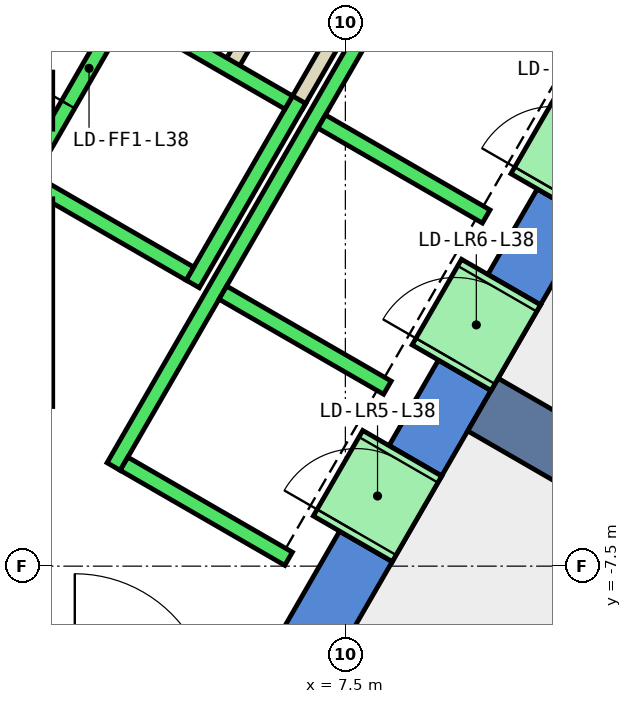
"""IFC4 building model, lengths in metres.
Left out: names, types, materials, properties, quantities, classifications, styles, units other than length and angle.
Written with IfcOpenShell. Run it as: python <this file> out.ifc"""

import sys

from ifc_helpers import new_model, si_unit, direction, frame, frame_2d, origin, place, context, subcontext, project, spatial, polyline, rectangle, outline, extrude, element, fill, save


model = new_model("IFC4")
c1 = context("Model", 3, precision=1e-05, world=origin(), true_north=direction((0.0, 1.0)))
c2 = subcontext(c1, "Body", "Model", "MODEL_VIEW")
j1 = project(units=[si_unit("LENGTHUNIT", "METRE"), si_unit("PLANEANGLEUNIT", "RADIAN")], contexts=[c1])
p1 = place(None, origin())
s1 = spatial("IfcSite", under=j1, at=p1, CompositionType="ELEMENT")
p2 = place(p1, origin())
s2 = spatial("IfcBuilding", under=s1, at=p2, CompositionType="ELEMENT")
p3 = place(p2, frame((0.0, 0.0, 171.8)))
s3 = spatial("IfcBuildingStorey", under=s2, at=p3, CompositionType="ELEMENT", Elevation=171.8)
p4 = place(p3, frame((0.0, 0.0, -0.4)))
e1 = element("IfcWall", 1, at=p4, inside=s3, PredefinedType="SHEAR", context=c2, shape_type="SweptSolid", body=[
    extrude(outline(polyline([(8.117, -7.44), (7.424, -7.04), (6.466, -8.7), (6.928, -9.5), (8.117, -7.44)])), origin(), (0.0, 0.0, 1.0), 4.2),
])
p5 = place(p3, frame((0.0, 0.0, -0.4)))
e2 = element("IfcWall", 2, at=p5, inside=s3, PredefinedType="SHEAR", context=c2, shape_type="SweptSolid", body=[
    extrude(outline(polyline([(9.417, -5.189), (8.724, -4.789), (8.075, -5.914), (8.767, -6.314), (9.417, -5.189)])), origin(), (0.0, 0.0, 1.0), 4.2),
])
p6 = place(p3, frame((0.0, 0.0, -0.4)))
e3 = element("IfcWall", 3, at=p6, inside=s3, PredefinedType="SHEAR", context=c2, shape_type="SweptSolid", body=[
    extrude(outline(polyline([(10.717, -2.937), (10.025, -2.537), (9.374, -3.663), (10.067, -4.063), (10.717, -2.937)])), origin(), (0.0, 0.0, 1.0), 4.2),
])
p7 = place(p3, frame((0.0, 0.0, 3.6)))
e4 = element("IfcWall", 4, at=p7, inside=s3, PredefinedType="SHEAR", context=c2, shape_type="SweptSolid", body=[
    extrude(outline(polyline([(8.767, -6.314), (8.075, -5.914), (7.424, -7.04), (8.117, -7.44), (8.767, -6.314)])), origin(), (0.0, 0.0, 1.0), 0.2),
])
p8 = place(p3, frame((0.0, 0.0, 3.6)))
e5 = element("IfcWall", 5, at=p8, inside=s3, PredefinedType="SHEAR", context=c2, shape_type="SweptSolid", body=[
    extrude(outline(polyline([(10.067, -4.063), (9.374, -3.663), (8.724, -4.789), (9.417, -5.189), (10.067, -4.063)])), origin(), (0.0, 0.0, 1.0), 0.2),
])
p9 = place(p3, frame((0.0, 0.0, 3.6)))
e6 = element("IfcWall", 6, at=p9, inside=s3, PredefinedType="SHEAR", context=c2, shape_type="SweptSolid", body=[
    extrude(outline(polyline([(11.367, -1.811), (10.675, -1.411), (10.025, -2.537), (10.717, -2.937), (11.367, -1.811)])), origin(), (0.0, 0.0, 1.0), 0.2),
])
p10 = place(p3, frame((9.31, -5.375, -0.4), z_axis=(0.0, 0.0, 1.0), x_axis=(0.866017533419, -0.500013631625, 0.0)))
e7 = element("IfcWall", 7, at=p10, inside=s3, PredefinedType="SHEAR", context=c2, shape_type="SweptSolid", body=[
    extrude(rectangle(XDim=9.0, YDim=0.8, at=frame_2d((4.5, 0.0))), origin(), (0.0, 0.0, 1.0), 4.2),
])
p11 = place(p3, frame((6.826, 0.522, 0.0), z_axis=(0.0, 0.0, 1.0), x_axis=(-0.500016722714, -0.866015748706, 0.0)))
e8 = element("IfcWall", 8, at=p11, inside=s3, PredefinedType="PARTITIONING", context=c2, shape_type="SweptSolid", body=[
    extrude(rectangle(XDim=1.7, YDim=0.2, at=frame_2d((0.85, 0.0))), origin(), (0.0, 0.0, 1.0), 3.8),
])
p12 = place(p3, frame((8.192, 0.888, 0.0), z_axis=(0.0, 0.0, 1.0), x_axis=(-0.499940625693, -0.866059680843, 0.0)))
e9 = element("IfcWall", 9, at=p12, inside=s3, PredefinedType="PARTITIONING", context=c2, shape_type="SweptSolid", body=[
    extrude(rectangle(XDim=2.68, YDim=0.2, at=frame_2d((1.34, 0.0))), origin(), (0.0, 0.0, 1.0), 3.8),
])
p13 = place(p3, frame((12.401, -7.621, 0.0), z_axis=(0.0, 0.0, 1.0), x_axis=(-0.499983724212, -0.866034800411, 0.0)))
e10 = element("IfcWall", 10, at=p13, inside=s3, PredefinedType="PARTITIONING", context=c2, shape_type="SweptSolid", body=[
    extrude(rectangle(XDim=9.302, YDim=0.2, at=frame_2d((4.651, 0.0))), origin(), (0.0, 0.0, 1.0), 3.8),
])
p14 = place(p3, frame((3.24, -2.488, 0.0), z_axis=(0.0, 0.0, 1.0), x_axis=(0.49994636267, 0.866056369097, 0.0)))
e11 = element("IfcWall", 11, at=p14, inside=s3, PredefinedType="STANDARD", context=c2, shape_type="SweptSolid", body=[
    extrude(rectangle(XDim=2.8, YDim=0.2, at=frame_2d((1.4, 0.0))), origin(), (0.0, 0.0, 1.0), 3.8),
])
p15 = place(p14, frame((1.225, 0.0, 0.0)))
e12 = element("IfcOpeningElement", 12, at=p15, cuts=e11, PredefinedType="OPENING", context=c2, shape_type="SweptSolid", body=[
    extrude(rectangle(XDim=1.1, YDim=2.1, at=frame_2d((0.55, 1.05))), frame((0.0, 0.11, 0.0), z_axis=(0.0, -1.0, 0.0), x_axis=(1.0, 0.0, 0.0)), (0.0, 0.0, 1.0), 0.22),
])
p16 = place(p3, frame((5.492, -3.788, 0.0), z_axis=(0.0, 0.0, 1.0), x_axis=(0.500011755427, 0.866018616679, 0.0)))
e13 = element("IfcWall", 13, at=p16, inside=s3, PredefinedType="STANDARD", context=c2, shape_type="SweptSolid", body=[
    extrude(rectangle(XDim=2.8, YDim=0.2, at=frame_2d((1.4, 0.0))), origin(), (0.0, 0.0, 1.0), 3.8),
])
p17 = place(p3, frame((3.377, -2.452, 0.0), z_axis=(0.0, 0.0, 1.0), x_axis=(0.865955154139, -0.50012165622, 0.0)))
e14 = element("IfcWall", 14, at=p17, inside=s3, PredefinedType="STANDARD", context=c2, shape_type="SweptSolid", body=[
    extrude(rectangle(XDim=2.4, YDim=0.2, at=frame_2d((1.2, 0.0))), origin(), (0.0, 0.0, 1.0), 3.8),
])
p18 = place(p3, frame((4.677, -0.2, 0.0), z_axis=(0.0, 0.0, 1.0), x_axis=(0.865973769406, -0.500089422704, 0.0)))
e15 = element("IfcWall", 15, at=p18, inside=s3, PredefinedType="STANDARD", context=c2, shape_type="SweptSolid", body=[
    extrude(rectangle(XDim=2.399, YDim=0.2, at=frame_2d((1.2, 0.0))), origin(), (0.0, 0.0, 1.0), 3.8),
])
p19 = place(p3, frame((4.451, -6.19, 0.0), z_axis=(0.0, 0.0, 1.0), x_axis=(0.50000090737, 0.866024879913, 0.0)))
e16 = element("IfcWall", 16, at=p19, inside=s3, PredefinedType="STANDARD", context=c2, shape_type="SweptSolid", body=[
    extrude(rectangle(XDim=10.6, YDim=0.2, at=frame_2d((5.3, 0.0))), origin(), (0.0, 0.0, 1.0), 3.8),
])
for number, where, z_axis, x_axis in (
    (17, (4.588, -6.153, 0.0), (0.0, 0.0, 1.0), (0.866, -0.5, 0.0)),
    (18, (5.888, -3.902, 0.0), (0.0, 0.0, 1.0), (0.866, -0.5, 0.0)),
    (19, (7.188, -1.65, 0.0), (0.0, 0.0, 1.0), (0.866, -0.5, 0.0)),
):
    element("IfcWall", number, at=place(p3, frame(where, z_axis=z_axis, x_axis=x_axis)), inside=s3, PredefinedType="STANDARD", context=c2, shape_type="SweptSolid", body=[
        extrude(rectangle(XDim=2.5, YDim=0.2, at=frame_2d((1.25, 0.0))), origin(), (0.0, 0.0, 1.0), 3.8),
    ])
p20 = place(p3, frame((7.598, -7.14, 0.0), z_axis=(0.0, 0.0, 1.0), x_axis=(0.500362116554, 0.865816234728, 0.0)))
e20 = element("IfcWall", 20, at=p20, inside=s3, PredefinedType="STANDARD", context=c2, shape_type="SweptSolid", body=[
    extrude(rectangle(XDim=1.299, YDim=1.2, at=frame_2d((0.65, 0.0))), origin(), (0.0, 0.0, 1.0), 2.4),
])
p21 = place(p20, frame((0.1, 0.0, 0.0)))
e21 = element("IfcOpeningElement", 21, at=p21, cuts=e20, PredefinedType="OPENING", context=c2, shape_type="SweptSolid", body=[
    extrude(rectangle(XDim=1.1, YDim=2.3, at=frame_2d((0.55, 1.15))), frame((0.0, 0.61, 0.0), z_axis=(0.0, -1.0, 0.0), x_axis=(1.0, 0.0, 0.0)), (0.0, 0.0, 1.0), 1.22),
])
p22 = place(p3, frame((8.898, -4.889, 0.0), z_axis=(0.0, 0.0, 1.0), x_axis=(0.500036693733, 0.866004217611, 0.0)))
e22 = element("IfcWall", 22, at=p22, inside=s3, PredefinedType="STANDARD", context=c2, shape_type="SweptSolid", body=[
    extrude(rectangle(XDim=1.3, YDim=1.2, at=frame_2d((0.65, 0.0))), origin(), (0.0, 0.0, 1.0), 2.4),
])
p23 = place(p22, frame((0.1, 0.0, 0.0)))
e23 = element("IfcOpeningElement", 23, at=p23, cuts=e22, PredefinedType="OPENING", context=c2, shape_type="SweptSolid", body=[
    extrude(rectangle(XDim=1.1, YDim=2.3, at=frame_2d((0.55, 1.15))), frame((0.0, 0.61, 0.0), z_axis=(0.0, -1.0, 0.0), x_axis=(1.0, 0.0, 0.0)), (0.0, 0.0, 1.0), 1.22),
])
p24 = place(p3, frame((10.198, -2.637, 0.0), z_axis=(0.0, 0.0, 1.0), x_axis=(0.49989585183, 0.866085525409, 0.0)))
e24 = element("IfcWall", 24, at=p24, inside=s3, PredefinedType="STANDARD", context=c2, shape_type="SweptSolid", body=[
    extrude(rectangle(XDim=1.3, YDim=1.2, at=frame_2d((0.65, 0.0))), origin(), (0.0, 0.0, 1.0), 2.4),
])
p25 = place(p24, frame((0.1, 0.0, 0.0)))
e25 = element("IfcOpeningElement", 25, at=p25, cuts=e24, PredefinedType="OPENING", context=c2, shape_type="SweptSolid", body=[
    extrude(rectangle(XDim=1.1, YDim=2.3, at=frame_2d((0.55, 1.15))), frame((0.0, 0.61, 0.0), z_axis=(0.0, -1.0, 0.0), x_axis=(1.0, 0.0, 0.0)), (0.0, 0.0, 1.0), 1.22),
])
p26 = place(p3, frame((3.55, -2.667, 0.0), z_axis=(0.0, 0.0, 1.0), x_axis=(0.0, -1.0, 0.0)))
e26 = element("IfcWall", 26, at=p26, inside=s3, PredefinedType="STANDARD", context=c2, shape_type="SweptSolid", body=[
    extrude(rectangle(XDim=2.733, YDim=0.2, at=frame_2d((1.366, 0.0))), origin(), (0.0, 0.0, 1.0), 3.8),
])
p27 = place(p3, frame((3.55, -1.0, 0.0), z_axis=(0.0, 0.0, 1.0), x_axis=(0.0, -1.0, 0.0)))
e27 = element("IfcWall", 27, at=p27, inside=s3, PredefinedType="STANDARD", context=c2, shape_type="SweptSolid", body=[
    extrude(rectangle(XDim=0.751, YDim=0.2, at=frame_2d((0.375, 0.0))), origin(), (0.0, 0.0, 1.0), 3.8),
])
p28 = place(p21, origin())
e28 = element("IfcDoor", 28, at=p28, inside=s3, OperationType="SLIDING_TO_LEFT", PredefinedType="DOOR", context=c2, shape_type="SweptSolid", body=[
    extrude(rectangle(XDim=1.1, YDim=2.3, at=frame_2d((0.55, 1.15))), frame((0.0, 0.025, 0.0), z_axis=(0.0, -1.0, 0.0), x_axis=(1.0, 0.0, 0.0)), (0.0, 0.0, 1.0), 0.05),
])
fill(e21, e28)
p29 = place(p23, origin())
e29 = element("IfcDoor", 29, at=p29, inside=s3, OperationType="SLIDING_TO_LEFT", PredefinedType="DOOR", context=c2, shape_type="SweptSolid", body=[
    extrude(rectangle(XDim=1.1, YDim=2.3, at=frame_2d((0.55, 1.15))), frame((0.0, 0.025, 0.0), z_axis=(0.0, -1.0, 0.0), x_axis=(1.0, 0.0, 0.0)), (0.0, 0.0, 1.0), 0.05),
])
fill(e23, e29)
p30 = place(p15, origin())
e30 = element("IfcDoor", 30, at=p30, inside=s3, OperationType="SLIDING_TO_LEFT", PredefinedType="DOOR", context=c2, shape_type="SweptSolid", body=[
    extrude(rectangle(XDim=1.1, YDim=2.1, at=frame_2d((0.55, 1.05))), frame((0.0, 0.025, 0.0), z_axis=(0.0, -1.0, 0.0), x_axis=(1.0, 0.0, 0.0)), (0.0, 0.0, 1.0), 0.05),
])
fill(e12, e30)
save(model, sys.argv[1])
